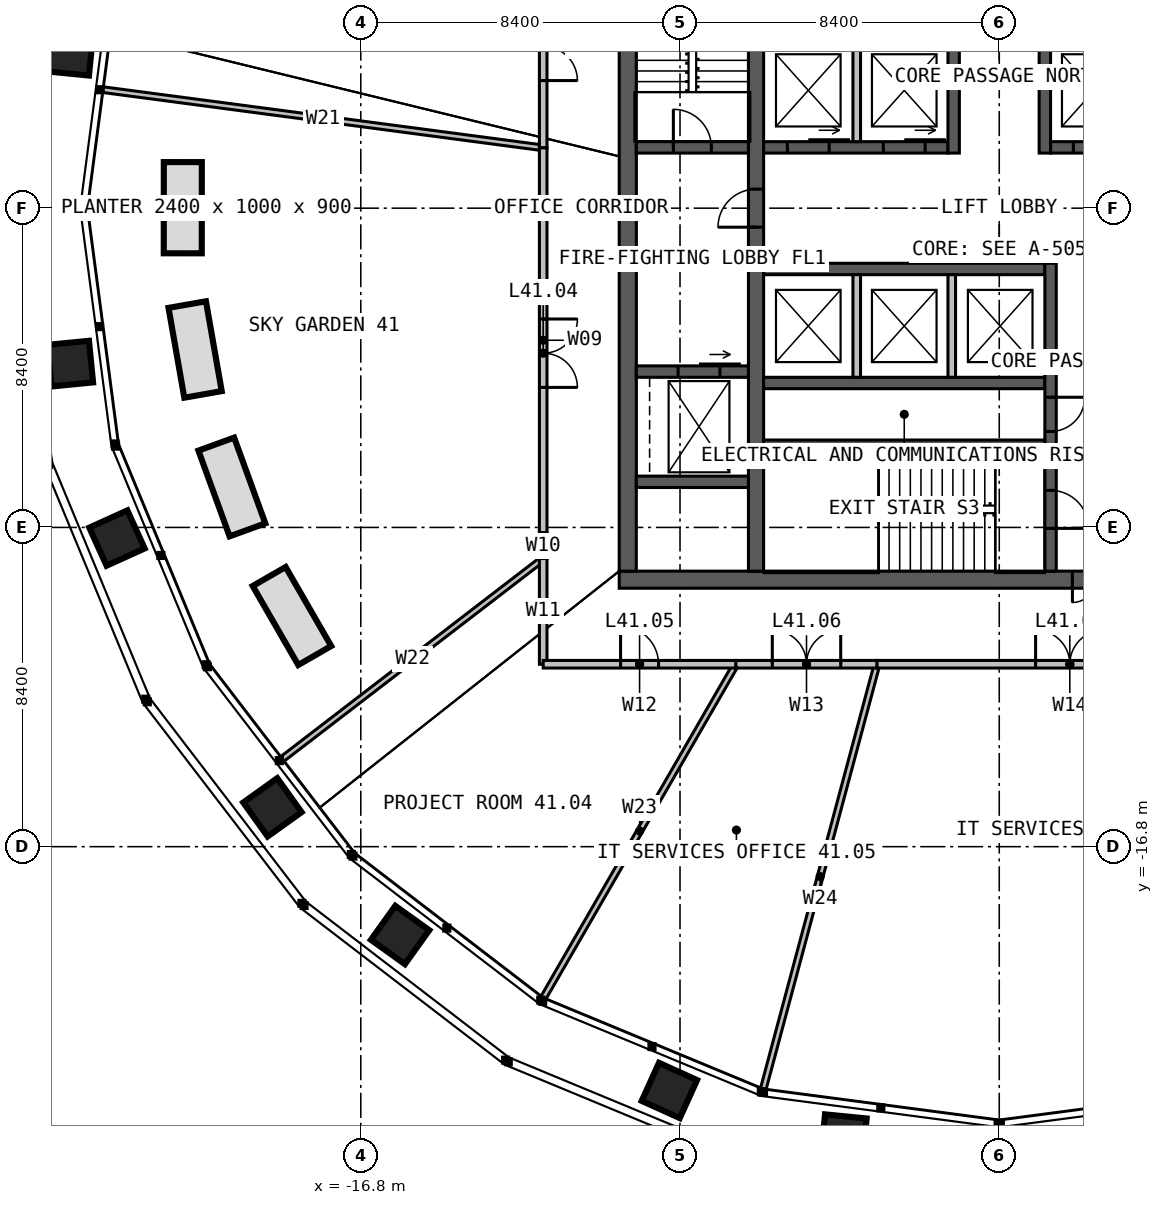
"""IFC4 building model, lengths in metres.
Left out: names, types, materials, properties, quantities, classifications, styles, units other than length and angle.
Written with IfcOpenShell. Run it as: python <this file> out.ifc"""

import sys

from ifc_helpers import new_model, si_unit, direction, frame, frame_2d, origin, place, context, subcontext, project, spatial, rectangle, extrude, element, fill, save


model = new_model("IFC4")
c1 = context("Model", 3, precision=1e-05, world=origin(), true_north=direction((0.0, 1.0)))
c2 = subcontext(c1, "Body", "Model", "MODEL_VIEW")
j1 = project(units=[si_unit("LENGTHUNIT", "METRE"), si_unit("PLANEANGLEUNIT", "RADIAN")], contexts=[c1])
p1 = place(None, origin())
s1 = spatial("IfcSite", under=j1, at=p1, CompositionType="ELEMENT")
p2 = place(p1, origin())
s2 = spatial("IfcBuilding", under=s1, at=p2, CompositionType="ELEMENT")
p3 = place(p2, frame((0.0, 0.0, 171.0)))
s3 = spatial("IfcBuildingStorey", under=s2, at=p3, CompositionType="ELEMENT", Elevation=171.0)
p4 = place(p3, frame((10.0, -9.775, 0.0), z_axis=(0.0, 0.0, 1.0), x_axis=(-1.0, 0.0, 0.0)))
e1 = element("IfcWall", 1, at=p4, inside=s3, PredefinedType="SOLIDWALL", context=c2, shape_type="SweptSolid", body=[
    extrude(rectangle(XDim=20.0, YDim=0.45, at=frame_2d((10.0, 0.0))), origin(), (0.0, 0.0, 1.0), 4.0),
])
p5 = place(p4, frame((6.875, 0.0, 0.0)))
e2 = element("IfcOpeningElement", 2, at=p5, cuts=e1, PredefinedType="OPENING", context=c2, shape_type="SweptSolid", body=[
    extrude(rectangle(XDim=1.2, YDim=2.2, at=frame_2d((0.6, 1.1))), frame((0.0, 0.235, 0.0), z_axis=(0.0, -1.0, 0.0), x_axis=(1.0, 0.0, 0.0)), (0.0, 0.0, 1.0), 0.47),
])
p6 = place(p3, frame((-9.775, 9.55, 0.0), z_axis=(0.0, 0.0, 1.0), x_axis=(0.0, -1.0, 0.0)))
e3 = element("IfcWall", 3, at=p6, inside=s3, PredefinedType="SOLIDWALL", context=c2, shape_type="SweptSolid", body=[
    extrude(rectangle(XDim=19.1, YDim=0.45, at=frame_2d((9.55, 0.0))), origin(), (0.0, 0.0, 1.0), 4.0),
])
p7 = place(p3, frame((-6.4, -9.55, 0.0), z_axis=(0.0, 0.0, 1.0), x_axis=(0.0, 1.0, 0.0)))
e4 = element("IfcWall", 4, at=p7, inside=s3, PredefinedType="SOLIDWALL", context=c2, shape_type="SweptSolid", body=[
    extrude(rectangle(XDim=19.1, YDim=0.4, at=frame_2d((9.55, 0.0))), origin(), (0.0, 0.0, 1.0), 4.0),
])
p8 = place(p7, frame((9.05, 0.0, 0.0)))
e5 = element("IfcOpeningElement", 5, at=p8, cuts=e4, PredefinedType="OPENING", context=c2, shape_type="SweptSolid", body=[
    extrude(rectangle(XDim=1.0, YDim=2.2, at=frame_2d((0.5, 1.1))), frame((0.0, 0.21, 0.0), z_axis=(0.0, -1.0, 0.0), x_axis=(1.0, 0.0, 0.0)), (0.0, 0.0, 1.0), 0.42),
])
p9 = place(p3, frame((-6.2, 1.6, 0.0), z_axis=(0.0, 0.0, 1.0), x_axis=(1.0, 0.0, 0.0)))
e6 = element("IfcWall", 6, at=p9, inside=s3, PredefinedType="SOLIDWALL", context=c2, shape_type="SweptSolid", body=[
    extrude(rectangle(XDim=4.85, YDim=0.3, at=frame_2d((2.425, 0.0))), origin(), (0.0, 0.0, 1.0), 4.0),
])
p10 = place(p9, frame((0.625, 0.0, 0.0)))
e7 = element("IfcOpeningElement", 7, at=p10, cuts=e6, PredefinedType="OPENING", context=c2, shape_type="SweptSolid", body=[
    extrude(rectangle(XDim=1.1, YDim=2.2, at=frame_2d((0.55, 1.1))), frame((0.0, 0.16, 0.0), z_axis=(0.0, -1.0, 0.0), x_axis=(1.0, 0.0, 0.0)), (0.0, 0.0, 1.0), 0.32),
])
p11 = place(p9, frame((3.15, 0.0, 0.0)))
e8 = element("IfcOpeningElement", 8, at=p11, cuts=e6, PredefinedType="OPENING", context=c2, shape_type="SweptSolid", body=[
    extrude(rectangle(XDim=1.1, YDim=2.2, at=frame_2d((0.55, 1.1))), frame((0.0, 0.16, 0.0), z_axis=(0.0, -1.0, 0.0), x_axis=(1.0, 0.0, 0.0)), (0.0, 0.0, 1.0), 0.32),
])
p12 = place(p3, frame((1.35, 1.6, 0.0), z_axis=(0.0, 0.0, 1.0), x_axis=(1.0, 0.0, 0.0)))
e9 = element("IfcWall", 9, at=p12, inside=s3, PredefinedType="SOLIDWALL", context=c2, shape_type="SweptSolid", body=[
    extrude(rectangle(XDim=4.85, YDim=0.3, at=frame_2d((2.425, 0.0))), origin(), (0.0, 0.0, 1.0), 4.0),
])
p13 = place(p12, frame((0.6, 0.0, 0.0)))
e10 = element("IfcOpeningElement", 10, at=p13, cuts=e9, PredefinedType="OPENING", context=c2, shape_type="SweptSolid", body=[
    extrude(rectangle(XDim=1.1, YDim=2.2, at=frame_2d((0.55, 1.1))), frame((0.0, 0.16, 0.0), z_axis=(0.0, -1.0, 0.0), x_axis=(1.0, 0.0, 0.0)), (0.0, 0.0, 1.0), 0.32),
])
p14 = place(p12, frame((3.125, 0.0, 0.0)))
e11 = element("IfcOpeningElement", 11, at=p14, cuts=e9, PredefinedType="OPENING", context=c2, shape_type="SweptSolid", body=[
    extrude(rectangle(XDim=1.1, YDim=2.2, at=frame_2d((0.55, 1.1))), frame((0.0, 0.16, 0.0), z_axis=(0.0, -1.0, 0.0), x_axis=(1.0, 0.0, 0.0)), (0.0, 0.0, 1.0), 0.32),
])
p15 = place(p3, frame((-1.2, 1.45, 0.0), z_axis=(0.0, 0.0, 1.0), x_axis=(0.0, 1.0, 0.0)))
e12 = element("IfcWall", 12, at=p15, inside=s3, PredefinedType="SOLIDWALL", context=c2, shape_type="SweptSolid", body=[
    extrude(rectangle(XDim=8.1, YDim=0.3, at=frame_2d((4.05, 0.0))), origin(), (0.0, 0.0, 1.0), 4.0),
])
p16 = place(p15, frame((5.05, 0.0, 0.0)))
e13 = element("IfcOpeningElement", 13, at=p16, cuts=e12, PredefinedType="OPENING", context=c2, shape_type="SweptSolid", body=[
    extrude(rectangle(XDim=1.0, YDim=2.2, at=frame_2d((0.5, 1.1))), frame((0.0, 0.16, 0.0), z_axis=(0.0, -1.0, 0.0), x_axis=(1.0, 0.0, 0.0)), (0.0, 0.0, 1.0), 0.32),
])
p17 = place(p3, frame((1.2, 1.45, 0.0), z_axis=(0.0, 0.0, 1.0), x_axis=(0.0, 1.0, 0.0)))
e14 = element("IfcWall", 14, at=p17, inside=s3, PredefinedType="SOLIDWALL", context=c2, shape_type="SweptSolid", body=[
    extrude(rectangle(XDim=8.1, YDim=0.3, at=frame_2d((4.05, 0.0))), origin(), (0.0, 0.0, 1.0), 4.0),
])
p18 = place(p17, frame((3.8, 0.0, 0.0)))
e15 = element("IfcOpeningElement", 15, at=p18, cuts=e14, PredefinedType="OPENING", context=c2, shape_type="SweptSolid", body=[
    extrude(rectangle(XDim=1.0, YDim=2.2, at=frame_2d((0.5, 1.1))), frame((0.0, 0.16, 0.0), z_axis=(0.0, -1.0, 0.0), x_axis=(1.0, 0.0, 0.0)), (0.0, 0.0, 1.0), 0.32),
])
p19 = place(p17, frame((6.15, 0.0, 0.0)))
e16 = element("IfcOpeningElement", 16, at=p19, cuts=e14, PredefinedType="OPENING", context=c2, shape_type="SweptSolid", body=[
    extrude(rectangle(XDim=1.0, YDim=2.2, at=frame_2d((0.5, 1.1))), frame((0.0, 0.16, 0.0), z_axis=(0.0, -1.0, 0.0), x_axis=(1.0, 0.0, 0.0)), (0.0, 0.0, 1.0), 0.32),
])
for number, where, z_axis, x_axis in (
    (17, (-6.2, -1.6, 0.0), (0.0, 0.0, 1.0), (1.0, 0.0, 0.0)),
    (18, (-6.2, -4.6, 0.0), (0.0, 0.0, 1.0), (1.0, 0.0, 0.0)),
):
    element("IfcWall", number, at=place(p3, frame(where, z_axis=z_axis, x_axis=x_axis)), inside=s3, PredefinedType="SOLIDWALL", context=c2, shape_type="SweptSolid", body=[
        extrude(rectangle(XDim=7.4, YDim=0.3, at=frame_2d((3.7, 0.0))), origin(), (0.0, 0.0, 1.0), 4.0),
    ])
p20 = place(p3, frame((1.35, -1.45, 0.0), z_axis=(0.0, 0.0, 1.0), x_axis=(0.0, -1.0, 0.0)))
e19 = element("IfcWall", 19, at=p20, inside=s3, PredefinedType="SOLIDWALL", context=c2, shape_type="SweptSolid", body=[
    extrude(rectangle(XDim=8.1, YDim=0.3, at=frame_2d((4.05, 0.0))), origin(), (0.0, 0.0, 1.0), 4.0),
])
p21 = place(p20, frame((5.975, 0.0, 0.0)))
e20 = element("IfcOpeningElement", 20, at=p21, cuts=e19, PredefinedType="OPENING", context=c2, shape_type="SweptSolid", body=[
    extrude(rectangle(XDim=1.0, YDim=2.2, at=frame_2d((0.5, 1.1))), frame((0.0, 0.16, 0.0), z_axis=(0.0, -1.0, 0.0), x_axis=(1.0, 0.0, 0.0)), (0.0, 0.0, 1.0), 0.32),
])
p22 = place(p20, frame((3.525, 0.0, 0.0)))
e21 = element("IfcOpeningElement", 21, at=p22, cuts=e19, PredefinedType="OPENING", context=c2, shape_type="SweptSolid", body=[
    extrude(rectangle(XDim=0.9, YDim=2.2, at=frame_2d((0.45, 1.1))), frame((0.0, 0.16, 0.0), z_axis=(0.0, -1.0, 0.0), x_axis=(1.0, 0.0, 0.0)), (0.0, 0.0, 1.0), 0.32),
])
p23 = place(p3, frame((-6.2, -6.2, 0.0), z_axis=(0.0, 0.0, 1.0), x_axis=(1.0, 0.0, 0.0)))
e22 = element("IfcWall", 22, at=p23, inside=s3, PredefinedType="SOLIDWALL", context=c2, shape_type="SweptSolid", body=[
    extrude(rectangle(XDim=7.4, YDim=0.2, at=frame_2d((3.7, 0.0))), origin(), (0.0, 0.0, 1.0), 4.0),
])
p24 = place(p3, frame((-9.55, 1.6, 0.0), z_axis=(0.0, 0.0, 1.0), x_axis=(1.0, 0.0, 0.0)))
e23 = element("IfcWall", 23, at=p24, inside=s3, PredefinedType="SOLIDWALL", context=c2, shape_type="SweptSolid", body=[
    extrude(rectangle(XDim=2.95, YDim=0.3, at=frame_2d((1.475, 0.0))), origin(), (0.0, 0.0, 1.0), 4.0),
])
p25 = place(p24, frame((0.975, 0.0, 0.0)))
e24 = element("IfcOpeningElement", 24, at=p25, cuts=e23, PredefinedType="OPENING", context=c2, shape_type="SweptSolid", body=[
    extrude(rectangle(XDim=1.0, YDim=2.2, at=frame_2d((0.5, 1.1))), frame((0.0, 0.16, 0.0), z_axis=(0.0, -1.0, 0.0), x_axis=(1.0, 0.0, 0.0)), (0.0, 0.0, 1.0), 0.32),
])
p26 = place(p3, frame((-9.55, -4.3, 0.0), z_axis=(0.0, 0.0, 1.0), x_axis=(1.0, 0.0, 0.0)))
e25 = element("IfcWall", 25, at=p26, inside=s3, PredefinedType="SOLIDWALL", context=c2, shape_type="SweptSolid", body=[
    extrude(rectangle(XDim=2.95, YDim=0.3, at=frame_2d((1.475, 0.0))), origin(), (0.0, 0.0, 1.0), 4.0),
])
p27 = place(p26, frame((1.1, 0.0, 0.0)))
e26 = element("IfcOpeningElement", 26, at=p27, cuts=e25, PredefinedType="OPENING", context=c2, shape_type="SweptSolid", body=[
    extrude(rectangle(XDim=1.1, YDim=2.2, at=frame_2d((0.55, 1.1))), frame((0.0, 0.16, 0.0), z_axis=(0.0, -1.0, 0.0), x_axis=(1.0, 0.0, 0.0)), (0.0, 0.0, 1.0), 0.32),
])
p28 = place(p3, frame((-9.55, -7.2, 0.0), z_axis=(0.0, 0.0, 1.0), x_axis=(1.0, 0.0, 0.0)))
e27 = element("IfcWall", 27, at=p28, inside=s3, PredefinedType="SOLIDWALL", context=c2, shape_type="SweptSolid", body=[
    extrude(rectangle(XDim=2.95, YDim=0.3, at=frame_2d((1.475, 0.0))), origin(), (0.0, 0.0, 1.0), 4.0),
])
for number, where, z_axis, x_axis in (
    (28, (-3.75, 1.75, 0.0), (0.0, 0.0, 1.0), (0.0, 1.0, 0.0)),
    (29, (-3.75, -1.75, 0.0), (0.0, 0.0, 1.0), (0.0, -1.0, 0.0)),
    (30, (-1.25, -1.75, 0.0), (0.0, 0.0, 1.0), (0.0, -1.0, 0.0)),
):
    element("IfcWall", number, at=place(p3, frame(where, z_axis=z_axis, x_axis=x_axis)), inside=s3, PredefinedType="SOLIDWALL", context=c2, shape_type="SweptSolid", body=[
        extrude(rectangle(XDim=2.7, YDim=0.2, at=frame_2d((1.35, 0.0))), origin(), (0.0, 0.0, 1.0), 3.75),
    ])
p29 = place(p3, frame((-12.0, 1.587, 0.0), z_axis=(0.0, 0.0, 1.0), x_axis=(-0.991370229238, 0.131091832627, 0.0)))
e31 = element("IfcWall", 31, at=p29, inside=s3, PredefinedType="PARTITIONING", context=c2, shape_type="SweptSolid", body=[
    extrude(rectangle(XDim=11.683, YDim=0.15, at=frame_2d((5.841, 0.0))), origin(), (0.0, 0.0, 1.0), 2.79),
])
p30 = place(p3, frame((-12.0, -9.219, 0.0), z_axis=(0.0, 0.0, 1.0), x_axis=(-0.793000302296, -0.60922124106, 0.0)))
e32 = element("IfcWall", 32, at=p30, inside=s3, PredefinedType="PARTITIONING", context=c2, shape_type="SweptSolid", body=[
    extrude(rectangle(XDim=8.655, YDim=0.15, at=frame_2d((4.327, 0.0))), origin(), (0.0, 0.0, 1.0), 2.79),
])
p31 = place(p3, frame((-6.928, -12.0, 0.0), z_axis=(0.0, 0.0, 1.0), x_axis=(-0.49999906822, -0.866025941747, 0.0)))
e33 = element("IfcWall", 33, at=p31, inside=s3, PredefinedType="PARTITIONING", context=c2, shape_type="SweptSolid", body=[
    extrude(rectangle(XDim=10.136, YDim=0.15, at=frame_2d((5.068, 0.0))), origin(), (0.0, 0.0, 1.0), 2.79),
])
p32 = place(p3, frame((-3.215, -12.0, 0.0), z_axis=(0.0, 0.0, 1.0), x_axis=(-0.258827502911, -0.965923559986, 0.0)))
e34 = element("IfcWall", 34, at=p32, inside=s3, PredefinedType="PARTITIONING", context=c2, shape_type="SweptSolid", body=[
    extrude(rectangle(XDim=11.569, YDim=0.15, at=frame_2d((5.785, 0.0))), origin(), (0.0, 0.0, 1.0), 2.79),
])
p33 = place(p3, frame((-12.0, 6.928, 0.0), z_axis=(0.0, 0.0, 1.0), x_axis=(0.0, -1.0, 0.0)))
e35 = element("IfcWall", 35, at=p33, inside=s3, PredefinedType="PARTITIONING", context=c2, shape_type="SweptSolid", body=[
    extrude(rectangle(XDim=5.342, YDim=0.2, at=frame_2d((2.671, 0.0))), origin(), (0.0, 0.0, 1.0), 3.8),
])
p34 = place(p33, frame((1.771, 0.0, 0.0)))
e36 = element("IfcOpeningElement", 36, at=p34, cuts=e35, PredefinedType="OPENING", context=c2, shape_type="SweptSolid", body=[
    extrude(rectangle(XDim=1.8, YDim=2.2, at=frame_2d((0.9, 1.1))), frame((0.0, 0.11, 0.0), z_axis=(0.0, -1.0, 0.0), x_axis=(1.0, 0.0, 0.0)), (0.0, 0.0, 1.0), 0.22),
])
p35 = place(p3, frame((-12.0, 1.587, 0.0), z_axis=(0.0, 0.0, 1.0), x_axis=(0.0, -1.0, 0.0)))
e37 = element("IfcWall", 37, at=p35, inside=s3, PredefinedType="PARTITIONING", context=c2, shape_type="SweptSolid", body=[
    extrude(rectangle(XDim=10.124, YDim=0.2, at=frame_2d((5.062, 0.0))), origin(), (0.0, 0.0, 1.0), 3.2),
])
p36 = place(p35, frame((4.503, 0.0, 0.0)))
e38 = element("IfcOpeningElement", 38, at=p36, cuts=e37, PredefinedType="OPENING", context=c2, shape_type="SweptSolid", body=[
    extrude(rectangle(XDim=1.8, YDim=2.2, at=frame_2d((0.9, 1.1))), frame((0.0, 0.11, 0.0), z_axis=(0.0, -1.0, 0.0), x_axis=(1.0, 0.0, 0.0)), (0.0, 0.0, 1.0), 0.22),
])
p37 = place(p3, frame((-12.0, -8.537, 0.0), z_axis=(0.0, 0.0, 1.0), x_axis=(0.0, -1.0, 0.0)))
e39 = element("IfcWall", 39, at=p37, inside=s3, PredefinedType="PARTITIONING", context=c2, shape_type="SweptSolid", body=[
    extrude(rectangle(XDim=0.682, YDim=0.2, at=frame_2d((0.341, 0.0))), origin(), (0.0, 0.0, 1.0), 3.8),
])
p38 = place(p3, frame((-12.0, -9.219, 0.0), z_axis=(0.0, 0.0, 1.0), x_axis=(0.0, -1.0, 0.0)))
e40 = element("IfcWall", 40, at=p38, inside=s3, PredefinedType="PARTITIONING", context=c2, shape_type="SweptSolid", body=[
    extrude(rectangle(XDim=2.781, YDim=0.2, at=frame_2d((1.391, 0.0))), origin(), (0.0, 0.0, 1.0), 3.8),
])
p39 = place(p3, frame((-12.0, -12.0, 0.0), z_axis=(0.0, 0.0, 1.0), x_axis=(1.0, 0.0, 0.0)))
e41 = element("IfcWall", 41, at=p39, inside=s3, PredefinedType="PARTITIONING", context=c2, shape_type="SweptSolid", body=[
    extrude(rectangle(XDim=5.072, YDim=0.2, at=frame_2d((2.536, 0.0))), origin(), (0.0, 0.0, 1.0), 3.8),
])
p40 = place(p39, frame((2.036, 0.0, 0.0)))
e42 = element("IfcOpeningElement", 42, at=p40, cuts=e41, PredefinedType="OPENING", context=c2, shape_type="SweptSolid", body=[
    extrude(rectangle(XDim=1.0, YDim=2.2, at=frame_2d((0.5, 1.1))), frame((0.0, 0.11, 0.0), z_axis=(0.0, -1.0, 0.0), x_axis=(1.0, 0.0, 0.0)), (0.0, 0.0, 1.0), 0.22),
])
p41 = place(p3, frame((-6.928, -12.0, 0.0), z_axis=(0.0, 0.0, 1.0), x_axis=(1.0, 0.0, 0.0)))
e43 = element("IfcWall", 43, at=p41, inside=s3, PredefinedType="PARTITIONING", context=c2, shape_type="SweptSolid", body=[
    extrude(rectangle(XDim=3.713, YDim=0.2, at=frame_2d((1.856, 0.0))), origin(), (0.0, 0.0, 1.0), 3.8),
])
p42 = place(p41, frame((0.956, 0.0, 0.0)))
e44 = element("IfcOpeningElement", 44, at=p42, cuts=e43, PredefinedType="OPENING", context=c2, shape_type="SweptSolid", body=[
    extrude(rectangle(XDim=1.8, YDim=2.2, at=frame_2d((0.9, 1.1))), frame((0.0, 0.11, 0.0), z_axis=(0.0, -1.0, 0.0), x_axis=(1.0, 0.0, 0.0)), (0.0, 0.0, 1.0), 0.22),
])
p43 = place(p3, frame((-3.215, -12.0, 0.0), z_axis=(0.0, 0.0, 1.0), x_axis=(1.0, 0.0, 0.0)))
e45 = element("IfcWall", 45, at=p43, inside=s3, PredefinedType="PARTITIONING", context=c2, shape_type="SweptSolid", body=[
    extrude(rectangle(XDim=10.144, YDim=0.2, at=frame_2d((5.072, 0.0))), origin(), (0.0, 0.0, 1.0), 3.8),
])
p44 = place(p43, frame((4.172, 0.0, 0.0)))
e46 = element("IfcOpeningElement", 46, at=p44, cuts=e45, PredefinedType="OPENING", context=c2, shape_type="SweptSolid", body=[
    extrude(rectangle(XDim=1.8, YDim=2.2, at=frame_2d((0.9, 1.1))), frame((0.0, 0.11, 0.0), z_axis=(0.0, -1.0, 0.0), x_axis=(1.0, 0.0, 0.0)), (0.0, 0.0, 1.0), 0.22),
])
p45 = place(p5, origin())
e47 = element("IfcDoor", 47, at=p45, inside=s3, OperationType="DOUBLE_DOOR_SINGLE_SWING", PredefinedType="DOOR", context=c2, shape_type="SweptSolid", body=[
    extrude(rectangle(XDim=1.2, YDim=2.2, at=frame_2d((0.6, 1.1))), frame((0.0, 0.025, 0.0), z_axis=(0.0, -1.0, 0.0), x_axis=(1.0, 0.0, 0.0)), (0.0, 0.0, 1.0), 0.05),
])
fill(e2, e47)
p46 = place(p8, origin())
e48 = element("IfcDoor", 48, at=p46, inside=s3, OperationType="SINGLE_SWING_LEFT", PredefinedType="DOOR", context=c2, shape_type="SweptSolid", body=[
    extrude(rectangle(XDim=1.0, YDim=2.2, at=frame_2d((0.5, 1.1))), frame((0.0, 0.025, 0.0), z_axis=(0.0, -1.0, 0.0), x_axis=(1.0, 0.0, 0.0)), (0.0, 0.0, 1.0), 0.05),
])
fill(e5, e48)
p47 = place(p25, origin())
e49 = element("IfcDoor", 49, at=p47, inside=s3, OperationType="SINGLE_SWING_LEFT", PredefinedType="DOOR", context=c2, shape_type="SweptSolid", body=[
    extrude(rectangle(XDim=1.0, YDim=2.2, at=frame_2d((0.5, 1.1))), frame((0.0, 0.025, 0.0), z_axis=(0.0, -1.0, 0.0), x_axis=(1.0, 0.0, 0.0)), (0.0, 0.0, 1.0), 0.05),
])
fill(e24, e49)
p48 = place(p21, origin())
e50 = element("IfcDoor", 50, at=p48, inside=s3, OperationType="SINGLE_SWING_RIGHT", PredefinedType="DOOR", context=c2, shape_type="SweptSolid", body=[
    extrude(rectangle(XDim=1.0, YDim=2.2, at=frame_2d((0.5, 1.1))), frame((0.0, 0.025, 0.0), z_axis=(0.0, -1.0, 0.0), x_axis=(1.0, 0.0, 0.0)), (0.0, 0.0, 1.0), 0.05),
])
fill(e20, e50)
p49 = place(p22, origin())
e51 = element("IfcDoor", 51, at=p49, inside=s3, OperationType="SINGLE_SWING_LEFT", PredefinedType="DOOR", context=c2, shape_type="SweptSolid", body=[
    extrude(rectangle(XDim=0.9, YDim=2.2, at=frame_2d((0.45, 1.1))), frame((0.0, 0.025, 0.0), z_axis=(0.0, -1.0, 0.0), x_axis=(1.0, 0.0, 0.0)), (0.0, 0.0, 1.0), 0.05),
])
fill(e21, e51)
p50 = place(p10, origin())
e52 = element("IfcDoor", 52, at=p50, inside=s3, OperationType="SLIDING_TO_LEFT", PredefinedType="DOOR", context=c2, shape_type="SweptSolid", body=[
    extrude(rectangle(XDim=1.1, YDim=2.2, at=frame_2d((0.55, 1.1))), frame((0.0, 0.025, 0.0), z_axis=(0.0, -1.0, 0.0), x_axis=(1.0, 0.0, 0.0)), (0.0, 0.0, 1.0), 0.05),
])
fill(e7, e52)
p51 = place(p11, origin())
e53 = element("IfcDoor", 53, at=p51, inside=s3, OperationType="SLIDING_TO_LEFT", PredefinedType="DOOR", context=c2, shape_type="SweptSolid", body=[
    extrude(rectangle(XDim=1.1, YDim=2.2, at=frame_2d((0.55, 1.1))), frame((0.0, 0.025, 0.0), z_axis=(0.0, -1.0, 0.0), x_axis=(1.0, 0.0, 0.0)), (0.0, 0.0, 1.0), 0.05),
])
fill(e8, e53)
p52 = place(p13, origin())
e54 = element("IfcDoor", 54, at=p52, inside=s3, OperationType="SLIDING_TO_LEFT", PredefinedType="DOOR", context=c2, shape_type="SweptSolid", body=[
    extrude(rectangle(XDim=1.1, YDim=2.2, at=frame_2d((0.55, 1.1))), frame((0.0, 0.025, 0.0), z_axis=(0.0, -1.0, 0.0), x_axis=(1.0, 0.0, 0.0)), (0.0, 0.0, 1.0), 0.05),
])
fill(e10, e54)
p53 = place(p27, origin())
e55 = element("IfcDoor", 55, at=p53, inside=s3, OperationType="SLIDING_TO_LEFT", PredefinedType="DOOR", context=c2, shape_type="SweptSolid", body=[
    extrude(rectangle(XDim=1.1, YDim=2.2, at=frame_2d((0.55, 1.1))), frame((0.0, 0.025, 0.0), z_axis=(0.0, -1.0, 0.0), x_axis=(1.0, 0.0, 0.0)), (0.0, 0.0, 1.0), 0.05),
])
fill(e26, e55)
p54 = place(p34, origin())
e56 = element("IfcDoor", 56, at=p54, inside=s3, OperationType="DOUBLE_DOOR_SINGLE_SWING", PredefinedType="DOOR", context=c2, shape_type="SweptSolid", body=[
    extrude(rectangle(XDim=1.8, YDim=2.2, at=frame_2d((0.9, 1.1))), frame((0.0, 0.025, 0.0), z_axis=(0.0, -1.0, 0.0), x_axis=(1.0, 0.0, 0.0)), (0.0, 0.0, 1.0), 0.05),
])
fill(e36, e56)
p55 = place(p36, origin())
e57 = element("IfcDoor", 57, at=p55, inside=s3, OperationType="DOUBLE_DOOR_SINGLE_SWING", PredefinedType="DOOR", context=c2, shape_type="SweptSolid", body=[
    extrude(rectangle(XDim=1.8, YDim=2.2, at=frame_2d((0.9, 1.1))), frame((0.0, 0.025, 0.0), z_axis=(0.0, -1.0, 0.0), x_axis=(1.0, 0.0, 0.0)), (0.0, 0.0, 1.0), 0.05),
])
fill(e38, e57)
p56 = place(p40, origin())
e58 = element("IfcDoor", 58, at=p56, inside=s3, OperationType="SINGLE_SWING_LEFT", PredefinedType="DOOR", context=c2, shape_type="SweptSolid", body=[
    extrude(rectangle(XDim=1.0, YDim=2.2, at=frame_2d((0.5, 1.1))), frame((0.0, 0.025, 0.0), z_axis=(0.0, -1.0, 0.0), x_axis=(1.0, 0.0, 0.0)), (0.0, 0.0, 1.0), 0.05),
])
fill(e42, e58)
p57 = place(p42, origin())
e59 = element("IfcDoor", 59, at=p57, inside=s3, OperationType="DOUBLE_DOOR_SINGLE_SWING", PredefinedType="DOOR", context=c2, shape_type="SweptSolid", body=[
    extrude(rectangle(XDim=1.8, YDim=2.2, at=frame_2d((0.9, 1.1))), frame((0.0, 0.025, 0.0), z_axis=(0.0, -1.0, 0.0), x_axis=(1.0, 0.0, 0.0)), (0.0, 0.0, 1.0), 0.05),
])
fill(e44, e59)
p58 = place(p44, origin())
e60 = element("IfcDoor", 60, at=p58, inside=s3, OperationType="DOUBLE_DOOR_SINGLE_SWING", PredefinedType="DOOR", context=c2, shape_type="SweptSolid", body=[
    extrude(rectangle(XDim=1.8, YDim=2.2, at=frame_2d((0.9, 1.1))), frame((0.0, 0.025, 0.0), z_axis=(0.0, -1.0, 0.0), x_axis=(1.0, 0.0, 0.0)), (0.0, 0.0, 1.0), 0.05),
])
fill(e46, e60)
save(model, sys.argv[1])
